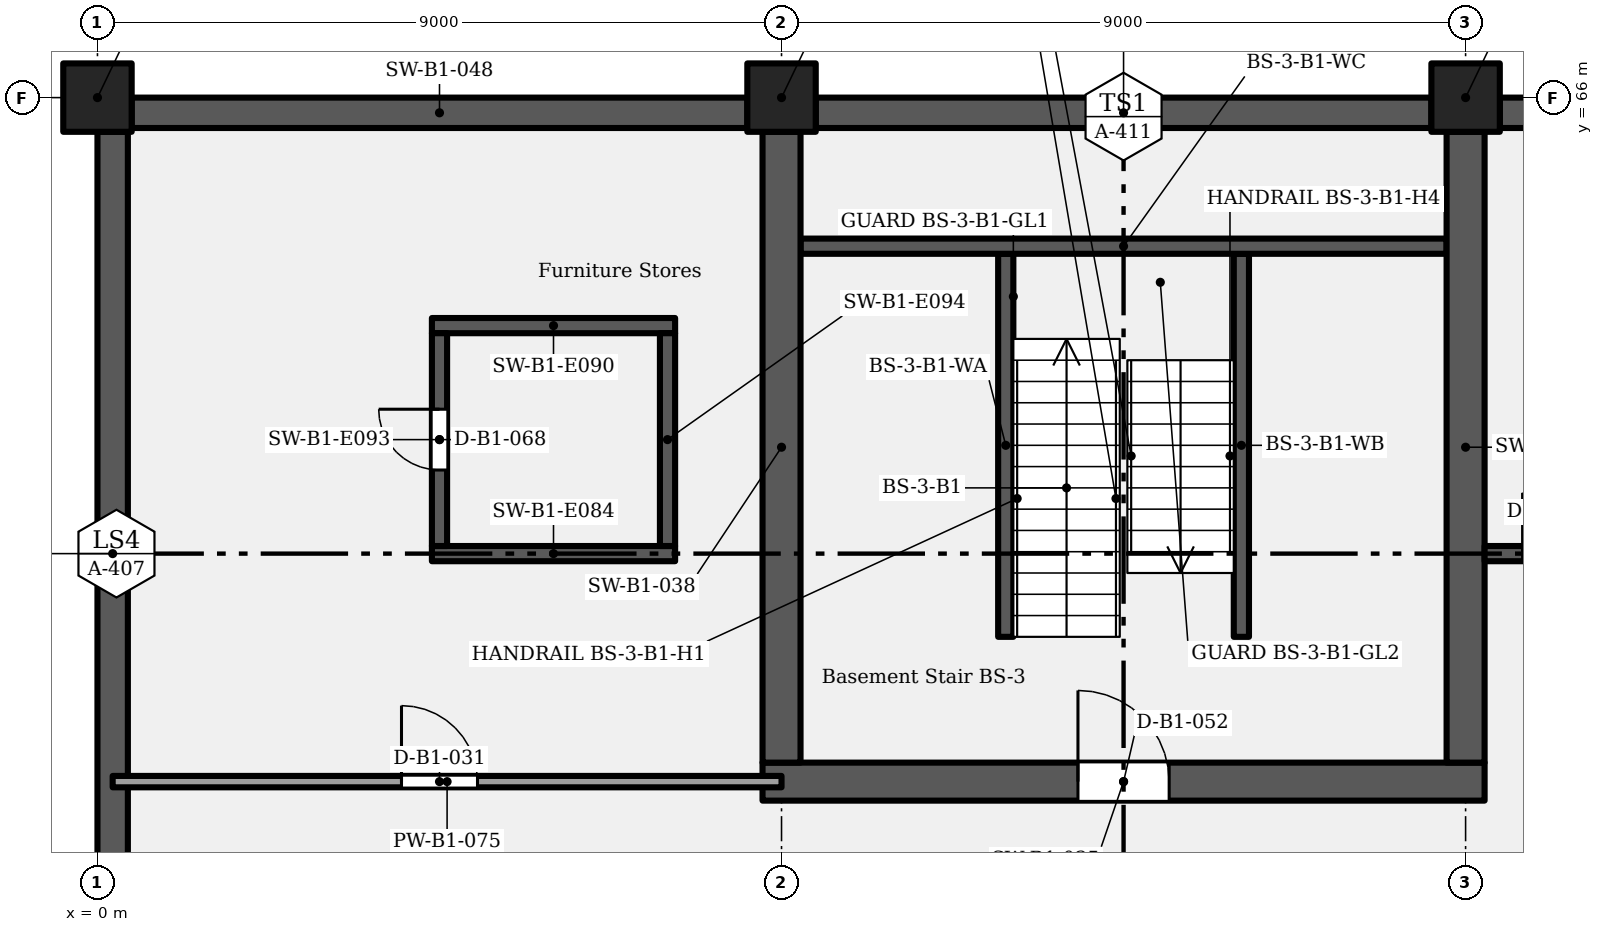
"""IFC4 building model, lengths in metres.
Left out: names, types, materials, properties, quantities, classifications, styles, units other than length and angle.
Written with IfcOpenShell. Run it as: python <this file> out.ifc"""

import sys

from ifc_helpers import new_model, si_unit, direction, frame, frame_2d, origin, origin_2d, place, context, subcontext, project, spatial, rectangle, extrude, element, fill, save


model = new_model("IFC4")
c1 = context("Model", 3, precision=1e-05, world=origin(), true_north=direction((0.0, 1.0)))
c2 = subcontext(c1, "Body", "Model", "MODEL_VIEW")
j1 = project(units=[si_unit("LENGTHUNIT", "METRE"), si_unit("PLANEANGLEUNIT", "RADIAN")], contexts=[c1])
p1 = place(None, origin())
s1 = spatial("IfcSite", under=j1, at=p1, CompositionType="ELEMENT")
p2 = place(p1, origin())
s2 = spatial("IfcBuilding", under=s1, at=p2, CompositionType="ELEMENT")
p3 = place(p2, frame((0.0, 0.0, -4.2)))
s3 = spatial("IfcBuildingStorey", under=s2, at=p3, CompositionType="ELEMENT", Elevation=-4.2)
for number, where, z_axis, x_axis in (
    (1, (0.0, 66.0, 0.0), (0.0, 0.0, 1.0), (1.0, 0.0, 0.0)),
    (2, (9.0, 66.0, 0.0), (0.0, 0.0, 1.0), (1.0, 0.0, 0.0)),
    (3, (18.0, 66.0, 0.0), (0.0, 0.0, 1.0), (1.0, 0.0, 0.0)),
):
    element("IfcColumn", number, at=place(p3, frame(where, z_axis=z_axis, x_axis=x_axis)), inside=s3, PredefinedType="COLUMN", context=c2, shape_type="SweptSolid", body=[
        extrude(rectangle(XDim=0.9, YDim=0.9, at=origin_2d()), origin(), (0.0, 0.0, 1.0), 4.2),
    ])
p4 = place(p3, frame((0.2, 54.45, 0.0), z_axis=(0.0, 0.0, 1.0), x_axis=(0.0, 1.0, 0.0)))
e4 = element("IfcWall", 4, at=p4, inside=s3, PredefinedType="SOLIDWALL", context=c2, shape_type="SweptSolid", body=[
    extrude(rectangle(XDim=11.1, YDim=0.4, at=frame_2d((5.55, 0.0))), origin(), (0.0, 0.0, 1.0), 3.9),
])
p5 = place(p3, frame((8.75, 57.0, 0.0), z_axis=(0.0, 0.0, 1.0), x_axis=(1.0, 0.0, 0.0)))
e5 = element("IfcWall", 5, at=p5, inside=s3, PredefinedType="SHEAR", context=c2, shape_type="SweptSolid", body=[
    extrude(rectangle(XDim=9.5, YDim=0.5, at=frame_2d((4.75, 0.0))), origin(), (0.0, 0.0, 1.0), 3.9),
])
p6 = place(p5, frame((4.15, 0.0, 0.0)))
e6 = element("IfcOpeningElement", 6, at=p6, cuts=e5, PredefinedType="OPENING", context=c2, shape_type="SweptSolid", body=[
    extrude(rectangle(XDim=1.2, YDim=2.1, at=frame_2d((0.6, 1.05))), frame((0.0, 0.26, 0.0), z_axis=(0.0, -1.0, 0.0), x_axis=(1.0, 0.0, 0.0)), (0.0, 0.0, 1.0), 0.52),
])
for number, where, z_axis, x_axis in (
    (7, (9.0, 57.25, 0.0), (0.0, 0.0, 1.0), (0.0, 1.0, 0.0)),
    (8, (18.0, 57.25, 0.0), (0.0, 0.0, 1.0), (0.0, 1.0, 0.0)),
):
    element("IfcWall", number, at=place(p3, frame(where, z_axis=z_axis, x_axis=x_axis)), inside=s3, PredefinedType="SHEAR", context=c2, shape_type="SweptSolid", body=[
        extrude(rectangle(XDim=8.3, YDim=0.5, at=frame_2d((4.15, 0.0))), origin(), (0.0, 0.0, 1.0), 3.9),
    ])
for number, where, z_axis, x_axis in (
    (9, (0.45, 65.8, 0.0), (0.0, 0.0, 1.0), (1.0, 0.0, 0.0)),
    (10, (9.45, 65.8, 0.0), (0.0, 0.0, 1.0), (1.0, 0.0, 0.0)),
    (11, (18.45, 65.8, 0.0), (0.0, 0.0, 1.0), (1.0, 0.0, 0.0)),
):
    element("IfcWall", number, at=place(p3, frame(where, z_axis=z_axis, x_axis=x_axis)), inside=s3, PredefinedType="SOLIDWALL", context=c2, shape_type="SweptSolid", body=[
        extrude(rectangle(XDim=8.1, YDim=0.4, at=frame_2d((4.05, 0.0))), origin(), (0.0, 0.0, 1.0), 3.9),
    ])
p7 = place(p3, frame((0.2, 57.0, 0.0), z_axis=(0.0, 0.0, 1.0), x_axis=(1.0, 0.0, 0.0)))
e12 = element("IfcWall", 12, at=p7, inside=s3, PredefinedType="PARTITIONING", context=c2, shape_type="SweptSolid", body=[
    extrude(rectangle(XDim=8.8, YDim=0.15, at=frame_2d((4.4, 0.0))), origin(), (0.0, 0.0, 1.0), 3.9),
])
p8 = place(p7, frame((3.8, 0.0, 0.0)))
e13 = element("IfcOpeningElement", 13, at=p8, cuts=e12, PredefinedType="OPENING", context=c2, shape_type="SweptSolid", body=[
    extrude(rectangle(XDim=1.0, YDim=2.1, at=frame_2d((0.5, 1.05))), frame((0.0, 0.085, 0.0), z_axis=(0.0, -1.0, 0.0), x_axis=(1.0, 0.0, 0.0)), (0.0, 0.0, 1.0), 0.17),
])
p9 = place(p3, frame((4.4, 60.0, 0.0), z_axis=(0.0, 0.0, 1.0), x_axis=(1.0, 0.0, 0.0)))
e14 = element("IfcWall", 14, at=p9, inside=s3, PredefinedType="SHEAR", context=c2, shape_type="SweptSolid", body=[
    extrude(rectangle(XDim=3.2, YDim=0.2, at=frame_2d((1.6, 0.0))), origin(), (0.0, 0.0, 1.0), 3.9),
])
p10 = place(p3, frame((18.25, 60.0, 0.0), z_axis=(0.0, 0.0, 1.0), x_axis=(1.0, 0.0, 0.0)))
e15 = element("IfcWall", 15, at=p10, inside=s3, PredefinedType="SHEAR", context=c2, shape_type="SweptSolid", body=[
    extrude(rectangle(XDim=4.35, YDim=0.2, at=frame_2d((2.175, 0.0))), origin(), (0.0, 0.0, 1.0), 3.9),
])
p11 = place(p10, frame((0.5, 0.0, 0.0)))
e16 = element("IfcOpeningElement", 16, at=p11, cuts=e15, PredefinedType="OPENING", context=c2, shape_type="SweptSolid", body=[
    extrude(rectangle(XDim=0.8, YDim=2.0, at=frame_2d((0.4, 1.0))), frame((0.0, 0.11, 0.0), z_axis=(0.0, -1.0, 0.0), x_axis=(1.0, 0.0, 0.0)), (0.0, 0.0, 1.0), 0.22),
])
p12 = place(p10, frame((2.75, 0.0, 0.0)))
e17 = element("IfcOpeningElement", 17, at=p12, cuts=e15, PredefinedType="OPENING", context=c2, shape_type="SweptSolid", body=[
    extrude(rectangle(XDim=0.8, YDim=2.0, at=frame_2d((0.4, 1.0))), frame((0.0, 0.11, 0.0), z_axis=(0.0, -1.0, 0.0), x_axis=(1.0, 0.0, 0.0)), (0.0, 0.0, 1.0), 0.22),
])
p13 = place(p3, frame((4.4, 63.0, 0.0), z_axis=(0.0, 0.0, 1.0), x_axis=(1.0, 0.0, 0.0)))
e18 = element("IfcWall", 18, at=p13, inside=s3, PredefinedType="SHEAR", context=c2, shape_type="SweptSolid", body=[
    extrude(rectangle(XDim=3.2, YDim=0.2, at=frame_2d((1.6, 0.0))), origin(), (0.0, 0.0, 1.0), 3.9),
])
p14 = place(p3, frame((4.5, 60.1, 0.0), z_axis=(0.0, 0.0, 1.0), x_axis=(0.0, 1.0, 0.0)))
e19 = element("IfcWall", 19, at=p14, inside=s3, PredefinedType="SHEAR", context=c2, shape_type="SweptSolid", body=[
    extrude(rectangle(XDim=2.8, YDim=0.2, at=frame_2d((1.4, 0.0))), origin(), (0.0, 0.0, 1.0), 3.9),
])
p15 = place(p14, frame((1.0, 0.0, 0.0)))
e20 = element("IfcOpeningElement", 20, at=p15, cuts=e19, PredefinedType="OPENING", context=c2, shape_type="SweptSolid", body=[
    extrude(rectangle(XDim=0.8, YDim=2.0, at=frame_2d((0.4, 1.0))), frame((0.0, 0.11, 0.0), z_axis=(0.0, -1.0, 0.0), x_axis=(1.0, 0.0, 0.0)), (0.0, 0.0, 1.0), 0.22),
])
p16 = place(p3, frame((7.5, 60.1, 0.0), z_axis=(0.0, 0.0, 1.0), x_axis=(0.0, 1.0, 0.0)))
e21 = element("IfcWall", 21, at=p16, inside=s3, PredefinedType="SHEAR", context=c2, shape_type="SweptSolid", body=[
    extrude(rectangle(XDim=2.8, YDim=0.2, at=frame_2d((1.4, 0.0))), origin(), (0.0, 0.0, 1.0), 3.9),
])
for number, where, z_axis, x_axis in (
    (22, (11.95, 58.905, 0.0), (0.0, 0.0, 1.0), (0.0, 1.0, 0.0)),
    (23, (15.05, 58.905, 0.0), (0.0, 0.0, 1.0), (0.0, 1.0, 0.0)),
):
    element("IfcWall", number, at=place(p3, frame(where, z_axis=z_axis, x_axis=x_axis)), inside=s3, PredefinedType="SHEAR", context=c2, shape_type="SweptSolid", body=[
        extrude(rectangle(XDim=5.04, YDim=0.2, at=frame_2d((2.52, 0.0))), origin(), (0.0, 0.0, 1.0), 3.9),
    ])
p17 = place(p3, frame((9.25, 64.045, 0.0), z_axis=(0.0, 0.0, 1.0), x_axis=(1.0, 0.0, 0.0)))
e24 = element("IfcWall", 24, at=p17, inside=s3, PredefinedType="SHEAR", context=c2, shape_type="SweptSolid", body=[
    extrude(rectangle(XDim=8.5, YDim=0.2, at=frame_2d((4.25, 0.0))), origin(), (0.0, 0.0, 1.0), 3.9),
])
p18 = place(p8, origin())
e25 = element("IfcDoor", 25, at=p18, inside=s3, OperationType="SINGLE_SWING_LEFT", PredefinedType="DOOR", context=c2, shape_type="SweptSolid", body=[
    extrude(rectangle(XDim=1.0, YDim=2.1, at=frame_2d((0.5, 1.05))), frame((0.0, 0.025, 0.0), z_axis=(0.0, -1.0, 0.0), x_axis=(1.0, 0.0, 0.0)), (0.0, 0.0, 1.0), 0.05),
])
fill(e13, e25)
p19 = place(p6, origin())
e26 = element("IfcDoor", 26, at=p19, inside=s3, OperationType="SINGLE_SWING_LEFT", PredefinedType="DOOR", context=c2, shape_type="SweptSolid", body=[
    extrude(rectangle(XDim=1.2, YDim=2.1, at=frame_2d((0.6, 1.05))), frame((0.0, 0.025, 0.0), z_axis=(0.0, -1.0, 0.0), x_axis=(1.0, 0.0, 0.0)), (0.0, 0.0, 1.0), 0.05),
])
fill(e6, e26)
p20 = place(p11, origin())
e27 = element("IfcDoor", 27, at=p20, inside=s3, OperationType="SINGLE_SWING_LEFT", PredefinedType="DOOR", context=c2, shape_type="SweptSolid", body=[
    extrude(rectangle(XDim=0.8, YDim=2.0, at=frame_2d((0.4, 1.0))), frame((0.0, 0.025, 0.0), z_axis=(0.0, -1.0, 0.0), x_axis=(1.0, 0.0, 0.0)), (0.0, 0.0, 1.0), 0.05),
])
fill(e16, e27)
p21 = place(p15, origin())
e28 = element("IfcDoor", 28, at=p21, inside=s3, OperationType="SINGLE_SWING_RIGHT", PredefinedType="DOOR", context=c2, shape_type="SweptSolid", body=[
    extrude(rectangle(XDim=0.8, YDim=2.0, at=frame_2d((0.4, 1.0))), frame((0.0, 0.025, 0.0), z_axis=(0.0, -1.0, 0.0), x_axis=(1.0, 0.0, 0.0)), (0.0, 0.0, 1.0), 0.05),
])
fill(e20, e28)
save(model, sys.argv[1])
